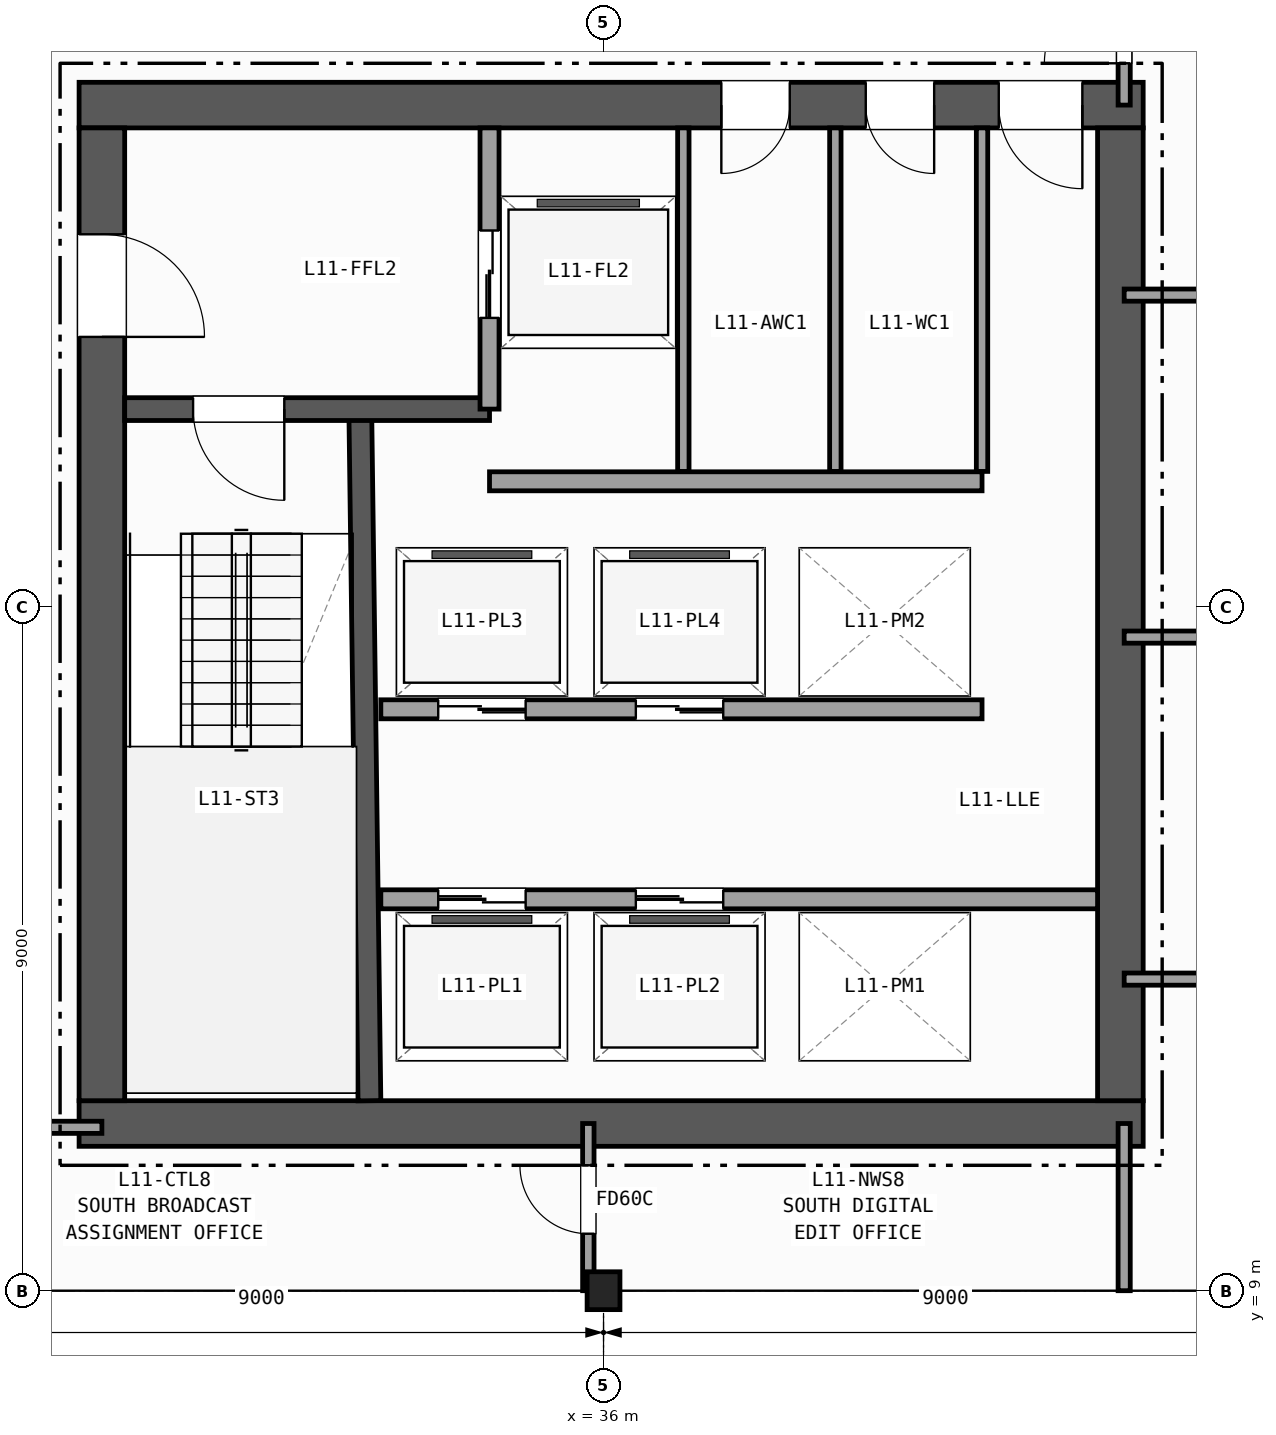
"""IFC4 building model, lengths in metres.
Left out: names, types, materials, properties, quantities, classifications, styles, units other than length and angle.
Written with IfcOpenShell. Run it as: python <this file> out.ifc"""

import sys

from ifc_helpers import new_model, si_unit, direction, frame, frame_2d, origin, origin_2d, place, context, subcontext, project, spatial, rectangle, i_section, extrude, element, fill, save


model = new_model("IFC4")
c1 = context("Model", 3, precision=1e-05, world=origin(), true_north=direction((0.0, 1.0)))
c2 = subcontext(c1, "Body", "Model", "MODEL_VIEW")
j1 = project(units=[si_unit("LENGTHUNIT", "METRE"), si_unit("PLANEANGLEUNIT", "RADIAN")], contexts=[c1])
p1 = place(None, origin())
s1 = spatial("IfcSite", under=j1, at=p1, CompositionType="ELEMENT")
p2 = place(p1, origin())
s2 = spatial("IfcBuilding", under=s1, at=p2, CompositionType="ELEMENT")
p3 = place(p2, frame((0.0, 0.0, 50.8)))
s3 = spatial("IfcBuildingStorey", under=s2, at=p3, CompositionType="ELEMENT", Elevation=50.8)
p4 = place(p3, frame((36.0, 9.0, 0.0), z_axis=(0.0, 0.0, 1.0), x_axis=(1.0, 0.0, 0.0)))
e1 = element("IfcColumn", 1, at=p4, inside=s3, PredefinedType="COLUMN", context=c2, shape_type="SweptSolid", body=[
    extrude(i_section(OverallWidth=0.432, OverallDepth=0.498, WebThickness=0.056, FlangeThickness=0.089, FilletRadius=0.015, at=origin_2d()), origin(), (0.0, 0.0, 1.0), 3.7),
])
p5 = place(p3, frame((29.1, 11.2, 0.0), z_axis=(0.0, 0.0, 1.0), x_axis=(1.0, 0.0, 0.0)))
e2 = element("IfcWall", 2, at=p5, inside=s3, PredefinedType="SHEAR", context=c2, shape_type="SweptSolid", body=[
    extrude(rectangle(XDim=14.0, YDim=0.6, at=frame_2d((7.0, 0.0))), origin(), (0.0, 0.0, 1.0), 3.42),
])
p6 = place(p3, frame((43.1, 24.6, 0.0), z_axis=(0.0, 0.0, 1.0), x_axis=(-1.0, 0.0, 0.0)))
e3 = element("IfcWall", 3, at=p6, inside=s3, PredefinedType="SHEAR", context=c2, shape_type="SweptSolid", body=[
    extrude(rectangle(XDim=14.0, YDim=0.6, at=frame_2d((7.0, 0.0))), origin(), (0.0, 0.0, 1.0), 3.42),
])
p7 = place(p6, frame((0.8, 0.0, 0.0)))
e4 = element("IfcOpeningElement", 4, at=p7, cuts=e3, PredefinedType="OPENING", context=c2, shape_type="SweptSolid", body=[
    extrude(rectangle(XDim=1.1, YDim=2.15, at=frame_2d((0.55, 1.075))), frame((0.0, 0.31, 0.0), z_axis=(0.0, -1.0, 0.0), x_axis=(1.0, 0.0, 0.0)), (0.0, 0.0, 1.0), 0.62),
])
p8 = place(p6, frame((2.75, 0.0, 0.0)))
e5 = element("IfcOpeningElement", 5, at=p8, cuts=e3, PredefinedType="OPENING", context=c2, shape_type="SweptSolid", body=[
    extrude(rectangle(XDim=0.9, YDim=2.1, at=frame_2d((0.45, 1.05))), frame((0.0, 0.31, 0.0), z_axis=(0.0, -1.0, 0.0), x_axis=(1.0, 0.0, 0.0)), (0.0, 0.0, 1.0), 0.62),
])
p9 = place(p6, frame((4.65, 0.0, 0.0)))
e6 = element("IfcOpeningElement", 6, at=p9, cuts=e3, PredefinedType="OPENING", context=c2, shape_type="SweptSolid", body=[
    extrude(rectangle(XDim=0.9, YDim=2.1, at=frame_2d((0.45, 1.05))), frame((0.0, 0.31, 0.0), z_axis=(0.0, -1.0, 0.0), x_axis=(1.0, 0.0, 0.0)), (0.0, 0.0, 1.0), 0.62),
])
p10 = place(p3, frame((29.4, 24.3, 0.0), z_axis=(0.0, 0.0, 1.0), x_axis=(0.0, -1.0, 0.0)))
e7 = element("IfcWall", 7, at=p10, inside=s3, PredefinedType="SHEAR", context=c2, shape_type="SweptSolid", body=[
    extrude(rectangle(XDim=12.8, YDim=0.6, at=frame_2d((6.4, 0.0))), origin(), (0.0, 0.0, 1.0), 3.42),
])
p11 = place(p10, frame((1.4, 0.0, 0.0)))
e8 = element("IfcOpeningElement", 8, at=p11, cuts=e7, PredefinedType="OPENING", context=c2, shape_type="SweptSolid", body=[
    extrude(rectangle(XDim=1.35, YDim=2.15, at=frame_2d((0.675, 1.075))), frame((0.0, 0.31, 0.0), z_axis=(0.0, -1.0, 0.0), x_axis=(1.0, 0.0, 0.0)), (0.0, 0.0, 1.0), 0.62),
])
p12 = place(p3, frame((42.8, 11.5, 0.0), z_axis=(0.0, 0.0, 1.0), x_axis=(0.0, 1.0, 0.0)))
e9 = element("IfcWall", 9, at=p12, inside=s3, PredefinedType="SHEAR", context=c2, shape_type="SweptSolid", body=[
    extrude(rectangle(XDim=12.8, YDim=0.6, at=frame_2d((6.4, 0.0))), origin(), (0.0, 0.0, 1.0), 3.42),
])
p13 = place(p3, frame((32.92, 11.5, 0.0), z_axis=(0.0, 0.0, 1.0), x_axis=(-0.013244407292, 0.999912288991, 0.0)))
e10 = element("IfcWall", 10, at=p13, inside=s3, PredefinedType="SHEAR", context=c2, shape_type="SweptSolid", body=[
    extrude(rectangle(XDim=9.051, YDim=0.3, at=frame_2d((4.525, 0.0))), origin(), (0.0, 0.0, 1.0), 3.42),
])
p14 = place(p3, frame((34.5, 20.6, 0.0), z_axis=(0.0, 0.0, 1.0), x_axis=(-1.0, 0.0, 0.0)))
e11 = element("IfcWall", 11, at=p14, inside=s3, PredefinedType="SHEAR", context=c2, shape_type="SweptSolid", body=[
    extrude(rectangle(XDim=4.8, YDim=0.3, at=frame_2d((2.4, 0.0))), origin(), (0.0, 0.0, 1.0), 3.42),
])
p15 = place(p14, frame((2.7, 0.0, 0.0)))
e12 = element("IfcOpeningElement", 12, at=p15, cuts=e11, PredefinedType="OPENING", context=c2, shape_type="SweptSolid", body=[
    extrude(rectangle(XDim=1.2, YDim=2.15, at=frame_2d((0.6, 1.075))), frame((0.0, 0.16, 0.0), z_axis=(0.0, -1.0, 0.0), x_axis=(1.0, 0.0, 0.0)), (0.0, 0.0, 1.0), 0.32),
])
p16 = place(p3, frame((34.5, 20.6, 0.0), z_axis=(0.0, 0.0, 1.0), x_axis=(0.0, 1.0, 0.0)))
e13 = element("IfcWall", 13, at=p16, inside=s3, PredefinedType="PARTITIONING", context=c2, shape_type="SweptSolid", body=[
    extrude(rectangle(XDim=3.7, YDim=0.25, at=frame_2d((1.85, 0.0))), origin(), (0.0, 0.0, 1.0), 3.42),
])
p17 = place(p16, frame((1.2, 0.0, 0.0)))
e14 = element("IfcOpeningElement", 14, at=p17, cuts=e13, PredefinedType="OPENING", context=c2, shape_type="SweptSolid", body=[
    extrude(rectangle(XDim=1.15, YDim=2.15, at=frame_2d((0.575, 1.075))), frame((0.0, 0.135, 0.0), z_axis=(0.0, -1.0, 0.0), x_axis=(1.0, 0.0, 0.0)), (0.0, 0.0, 1.0), 0.27),
])
p18 = place(p3, frame((34.5, 19.65, 0.0), z_axis=(0.0, 0.0, 1.0), x_axis=(1.0, 0.0, 0.0)))
e15 = element("IfcWall", 15, at=p18, inside=s3, PredefinedType="PARTITIONING", context=c2, shape_type="SweptSolid", body=[
    extrude(rectangle(XDim=6.48, YDim=0.25, at=frame_2d((3.24, 0.0))), origin(), (0.0, 0.0, 1.0), 3.42),
])
p19 = place(p3, frame((33.07, 14.15, 0.0), z_axis=(0.0, 0.0, 1.0), x_axis=(1.0, 0.0, 0.0)))
e16 = element("IfcWall", 16, at=p19, inside=s3, PredefinedType="PARTITIONING", context=c2, shape_type="SweptSolid", body=[
    extrude(rectangle(XDim=9.43, YDim=0.25, at=frame_2d((4.715, 0.0))), origin(), (0.0, 0.0, 1.0), 3.42),
])
p20 = place(p19, frame((0.755, 0.0, 0.0)))
e17 = element("IfcOpeningElement", 17, at=p20, cuts=e16, PredefinedType="OPENING", context=c2, shape_type="SweptSolid", body=[
    extrude(rectangle(XDim=1.15, YDim=2.15, at=frame_2d((0.575, 1.075))), frame((0.0, 0.135, 0.0), z_axis=(0.0, -1.0, 0.0), x_axis=(1.0, 0.0, 0.0)), (0.0, 0.0, 1.0), 0.27),
])
p21 = place(p19, frame((3.355, 0.0, 0.0)))
e18 = element("IfcOpeningElement", 18, at=p21, cuts=e16, PredefinedType="OPENING", context=c2, shape_type="SweptSolid", body=[
    extrude(rectangle(XDim=1.15, YDim=2.15, at=frame_2d((0.575, 1.075))), frame((0.0, 0.135, 0.0), z_axis=(0.0, -1.0, 0.0), x_axis=(1.0, 0.0, 0.0)), (0.0, 0.0, 1.0), 0.27),
])
p22 = place(p3, frame((40.98, 16.65, 0.0), z_axis=(0.0, 0.0, 1.0), x_axis=(-1.0, 0.0, 0.0)))
e19 = element("IfcWall", 19, at=p22, inside=s3, PredefinedType="PARTITIONING", context=c2, shape_type="SweptSolid", body=[
    extrude(rectangle(XDim=7.91, YDim=0.25, at=frame_2d((3.955, 0.0))), origin(), (0.0, 0.0, 1.0), 3.42),
])
p23 = place(p22, frame((6.005, 0.0, 0.0)))
e20 = element("IfcOpeningElement", 20, at=p23, cuts=e19, PredefinedType="OPENING", context=c2, shape_type="SweptSolid", body=[
    extrude(rectangle(XDim=1.15, YDim=2.15, at=frame_2d((0.575, 1.075))), frame((0.0, 0.135, 0.0), z_axis=(0.0, -1.0, 0.0), x_axis=(1.0, 0.0, 0.0)), (0.0, 0.0, 1.0), 0.27),
])
p24 = place(p22, frame((3.405, 0.0, 0.0)))
e21 = element("IfcOpeningElement", 21, at=p24, cuts=e19, PredefinedType="OPENING", context=c2, shape_type="SweptSolid", body=[
    extrude(rectangle(XDim=1.15, YDim=2.15, at=frame_2d((0.575, 1.075))), frame((0.0, 0.135, 0.0), z_axis=(0.0, -1.0, 0.0), x_axis=(1.0, 0.0, 0.0)), (0.0, 0.0, 1.0), 0.27),
])
for number, where, z_axis, x_axis in (
    (22, (37.05, 19.78, 0.0), (0.0, 0.0, 1.0), (0.0, 1.0, 0.0)),
    (23, (39.05, 19.78, 0.0), (0.0, 0.0, 1.0), (0.0, 1.0, 0.0)),
    (24, (40.98, 19.78, 0.0), (0.0, 0.0, 1.0), (0.0, 1.0, 0.0)),
):
    element("IfcWall", number, at=place(p3, frame(where, z_axis=z_axis, x_axis=x_axis)), inside=s3, PredefinedType="PARTITIONING", context=c2, shape_type="SweptSolid", body=[
        extrude(rectangle(XDim=4.52, YDim=0.15, at=frame_2d((2.26, 0.0))), origin(), (0.0, 0.0, 1.0), 3.42),
    ])
p25 = place(p3, frame((24.65, 11.15, 0.0), z_axis=(0.0, 0.0, 1.0), x_axis=(1.0, 0.0, 0.0)))
e25 = element("IfcWall", 25, at=p25, inside=s3, PredefinedType="PARTITIONING", context=c2, shape_type="SweptSolid", body=[
    extrude(rectangle(XDim=4.75, YDim=0.16, at=frame_2d((2.375, 0.0))), origin(), (0.0, 0.0, 1.0), 2.792),
])
p26 = place(p25, frame((1.2, 0.0, 0.0)))
e26 = element("IfcOpeningElement", 26, at=p26, cuts=e25, PredefinedType="OPENING", context=c2, shape_type="SweptSolid", body=[
    extrude(rectangle(XDim=0.95, YDim=2.1, at=frame_2d((0.475, 1.05))), frame((0.0, 0.09, 0.0), z_axis=(0.0, -1.0, 0.0), x_axis=(1.0, 0.0, 0.0)), (0.0, 0.0, 1.0), 0.18),
])
p27 = place(p3, frame((35.8, 9.0, 0.0), z_axis=(0.0, 0.0, 1.0), x_axis=(0.0, 1.0, 0.0)))
e27 = element("IfcWall", 27, at=p27, inside=s3, PredefinedType="PARTITIONING", context=c2, shape_type="SweptSolid", body=[
    extrude(rectangle(XDim=2.2, YDim=0.15, at=frame_2d((1.1, 0.0))), origin(), (0.0, 0.0, 1.0), 2.627),
])
p28 = place(p27, frame((0.75, 0.0, 0.0)))
e28 = element("IfcOpeningElement", 28, at=p28, cuts=e27, PredefinedType="OPENING", context=c2, shape_type="SweptSolid", body=[
    extrude(rectangle(XDim=0.9, YDim=2.1, at=frame_2d((0.45, 1.05))), frame((0.0, 0.085, 0.0), z_axis=(0.0, -1.0, 0.0), x_axis=(1.0, 0.0, 0.0)), (0.0, 0.0, 1.0), 0.17),
])
p29 = place(p3, frame((42.85, 9.0, 0.0), z_axis=(0.0, 0.0, 1.0), x_axis=(0.0, 1.0, 0.0)))
e29 = element("IfcWall", 29, at=p29, inside=s3, PredefinedType="PARTITIONING", context=c2, shape_type="SweptSolid", body=[
    extrude(rectangle(XDim=2.2, YDim=0.16, at=frame_2d((1.1, 0.0))), origin(), (0.0, 0.0, 1.0), 2.627),
])
p30 = place(p3, frame((42.85, 24.6, 0.0), z_axis=(0.0, 0.0, 1.0), x_axis=(0.0, 1.0, 0.0)))
e30 = element("IfcWall", 30, at=p30, inside=s3, PredefinedType="PARTITIONING", context=c2, shape_type="SweptSolid", body=[
    extrude(rectangle(XDim=2.4, YDim=0.16, at=frame_2d((1.2, 0.0))), origin(), (0.0, 0.0, 1.0), 2.627),
])
p31 = place(p30, frame((0.55, 0.0, 0.0)))
e31 = element("IfcOpeningElement", 31, at=p31, cuts=e30, PredefinedType="OPENING", context=c2, shape_type="SweptSolid", body=[
    extrude(rectangle(XDim=1.05, YDim=2.15, at=frame_2d((0.525, 1.075))), frame((0.0, 0.09, 0.0), z_axis=(0.0, -1.0, 0.0), x_axis=(1.0, 0.0, 0.0)), (0.0, 0.0, 1.0), 0.18),
])
p32 = place(p3, frame((42.85, 13.1, 0.0), z_axis=(0.0, 0.0, 1.0), x_axis=(1.0, 0.0, 0.0)))
e32 = element("IfcWall", 32, at=p32, inside=s3, PredefinedType="PARTITIONING", context=c2, shape_type="SweptSolid", body=[
    extrude(rectangle(XDim=20.346, YDim=0.16, at=frame_2d((10.173, 0.0))), origin(), (0.0, 0.0, 1.0), 3.42),
])
p33 = place(p32, frame((4.6, 0.0, 0.0)))
e33 = element("IfcOpeningElement", 33, at=p33, cuts=e32, PredefinedType="OPENING", context=c2, shape_type="SweptSolid", body=[
    extrude(rectangle(XDim=1.2, YDim=2.15, at=frame_2d((0.6, 1.075))), frame((0.0, 0.09, 0.0), z_axis=(0.0, -1.0, 0.0), x_axis=(1.0, 0.0, 0.0)), (0.0, 0.0, 1.0), 0.18),
])
p34 = place(p3, frame((42.85, 17.6, 0.0), z_axis=(0.0, 0.0, 1.0), x_axis=(1.0, 0.0, 0.0)))
e34 = element("IfcWall", 34, at=p34, inside=s3, PredefinedType="PARTITIONING", context=c2, shape_type="SweptSolid", body=[
    extrude(rectangle(XDim=20.809, YDim=0.16, at=frame_2d((10.404, 0.0))), origin(), (0.0, 0.0, 1.0), 3.42),
])
p35 = place(p34, frame((4.6, 0.0, 0.0)))
e35 = element("IfcOpeningElement", 35, at=p35, cuts=e34, PredefinedType="OPENING", context=c2, shape_type="SweptSolid", body=[
    extrude(rectangle(XDim=0.86, YDim=2.05, at=frame_2d((0.43, 1.025))), frame((0.0, 0.09, 0.0), z_axis=(0.0, -1.0, 0.0), x_axis=(1.0, 0.0, 0.0)), (0.0, 0.0, 1.0), 0.18),
])
p36 = place(p3, frame((42.85, 22.1, 0.0), z_axis=(0.0, 0.0, 1.0), x_axis=(1.0, 0.0, 0.0)))
e36 = element("IfcWall", 36, at=p36, inside=s3, PredefinedType="PARTITIONING", context=c2, shape_type="SweptSolid", body=[
    extrude(rectangle(XDim=20.428, YDim=0.16, at=frame_2d((10.214, 0.0))), origin(), (0.0, 0.0, 1.0), 3.42),
])
p37 = place(p36, frame((4.6, 0.0, 0.0)))
e37 = element("IfcOpeningElement", 37, at=p37, cuts=e36, PredefinedType="OPENING", context=c2, shape_type="SweptSolid", body=[
    extrude(rectangle(XDim=0.95, YDim=2.1, at=frame_2d((0.475, 1.05))), frame((0.0, 0.09, 0.0), z_axis=(0.0, -1.0, 0.0), x_axis=(1.0, 0.0, 0.0)), (0.0, 0.0, 1.0), 0.18),
])
p38 = place(p15, origin())
e38 = element("IfcDoor", 38, at=p38, inside=s3, OperationType="SINGLE_SWING_LEFT", PredefinedType="DOOR", context=c2, shape_type="SweptSolid", body=[
    extrude(rectangle(XDim=1.2, YDim=2.15, at=frame_2d((0.6, 1.075))), frame((0.0, 0.025, 0.0), z_axis=(0.0, -1.0, 0.0), x_axis=(1.0, 0.0, 0.0)), (0.0, 0.0, 1.0), 0.05),
])
fill(e12, e38)
p39 = place(p11, origin())
e39 = element("IfcDoor", 39, at=p39, inside=s3, OperationType="SINGLE_SWING_RIGHT", PredefinedType="DOOR", context=c2, shape_type="SweptSolid", body=[
    extrude(rectangle(XDim=1.35, YDim=2.15, at=frame_2d((0.675, 1.075))), frame((0.0, 0.025, 0.0), z_axis=(0.0, -1.0, 0.0), x_axis=(1.0, 0.0, 0.0)), (0.0, 0.0, 1.0), 0.05),
])
fill(e8, e39)
p40 = place(p7, origin())
e40 = element("IfcDoor", 40, at=p40, inside=s3, OperationType="SINGLE_SWING_LEFT", PredefinedType="DOOR", context=c2, shape_type="SweptSolid", body=[
    extrude(rectangle(XDim=1.1, YDim=2.15, at=frame_2d((0.55, 1.075))), frame((0.0, 0.025, 0.0), z_axis=(0.0, -1.0, 0.0), x_axis=(1.0, 0.0, 0.0)), (0.0, 0.0, 1.0), 0.05),
])
fill(e4, e40)
p41 = place(p8, origin())
e41 = element("IfcDoor", 41, at=p41, inside=s3, OperationType="SINGLE_SWING_LEFT", PredefinedType="DOOR", context=c2, shape_type="SweptSolid", body=[
    extrude(rectangle(XDim=0.9, YDim=2.1, at=frame_2d((0.45, 1.05))), frame((0.0, 0.025, 0.0), z_axis=(0.0, -1.0, 0.0), x_axis=(1.0, 0.0, 0.0)), (0.0, 0.0, 1.0), 0.05),
])
fill(e5, e41)
p42 = place(p9, origin())
e42 = element("IfcDoor", 42, at=p42, inside=s3, OperationType="SINGLE_SWING_RIGHT", PredefinedType="DOOR", context=c2, shape_type="SweptSolid", body=[
    extrude(rectangle(XDim=0.9, YDim=2.1, at=frame_2d((0.45, 1.05))), frame((0.0, 0.025, 0.0), z_axis=(0.0, -1.0, 0.0), x_axis=(1.0, 0.0, 0.0)), (0.0, 0.0, 1.0), 0.05),
])
fill(e6, e42)
p43 = place(p17, origin())
e43 = element("IfcDoor", 43, at=p43, inside=s3, OperationType="DOUBLE_DOOR_SLIDING", PredefinedType="DOOR", context=c2, shape_type="SweptSolid", body=[
    extrude(rectangle(XDim=1.15, YDim=2.15, at=frame_2d((0.575, 1.075))), frame((0.0, 0.025, 0.0), z_axis=(0.0, -1.0, 0.0), x_axis=(1.0, 0.0, 0.0)), (0.0, 0.0, 1.0), 0.05),
])
fill(e14, e43)
p44 = place(p20, origin())
e44 = element("IfcDoor", 44, at=p44, inside=s3, OperationType="DOUBLE_DOOR_SLIDING", PredefinedType="DOOR", context=c2, shape_type="SweptSolid", body=[
    extrude(rectangle(XDim=1.15, YDim=2.15, at=frame_2d((0.575, 1.075))), frame((0.0, 0.025, 0.0), z_axis=(0.0, -1.0, 0.0), x_axis=(1.0, 0.0, 0.0)), (0.0, 0.0, 1.0), 0.05),
])
fill(e17, e44)
p45 = place(p21, origin())
e45 = element("IfcDoor", 45, at=p45, inside=s3, OperationType="DOUBLE_DOOR_SLIDING", PredefinedType="DOOR", context=c2, shape_type="SweptSolid", body=[
    extrude(rectangle(XDim=1.15, YDim=2.15, at=frame_2d((0.575, 1.075))), frame((0.0, 0.025, 0.0), z_axis=(0.0, -1.0, 0.0), x_axis=(1.0, 0.0, 0.0)), (0.0, 0.0, 1.0), 0.05),
])
fill(e18, e45)
p46 = place(p23, origin())
e46 = element("IfcDoor", 46, at=p46, inside=s3, OperationType="DOUBLE_DOOR_SLIDING", PredefinedType="DOOR", context=c2, shape_type="SweptSolid", body=[
    extrude(rectangle(XDim=1.15, YDim=2.15, at=frame_2d((0.575, 1.075))), frame((0.0, 0.025, 0.0), z_axis=(0.0, -1.0, 0.0), x_axis=(1.0, 0.0, 0.0)), (0.0, 0.0, 1.0), 0.05),
])
fill(e20, e46)
p47 = place(p24, origin())
e47 = element("IfcDoor", 47, at=p47, inside=s3, OperationType="DOUBLE_DOOR_SLIDING", PredefinedType="DOOR", context=c2, shape_type="SweptSolid", body=[
    extrude(rectangle(XDim=1.15, YDim=2.15, at=frame_2d((0.575, 1.075))), frame((0.0, 0.025, 0.0), z_axis=(0.0, -1.0, 0.0), x_axis=(1.0, 0.0, 0.0)), (0.0, 0.0, 1.0), 0.05),
])
fill(e21, e47)
p48 = place(p28, origin())
e48 = element("IfcDoor", 48, at=p48, inside=s3, OperationType="SINGLE_SWING_RIGHT", PredefinedType="DOOR", context=c2, shape_type="SweptSolid", body=[
    extrude(rectangle(XDim=0.9, YDim=2.1, at=frame_2d((0.45, 1.05))), frame((0.0, 0.025, 0.0), z_axis=(0.0, -1.0, 0.0), x_axis=(1.0, 0.0, 0.0)), (0.0, 0.0, 1.0), 0.05),
])
fill(e28, e48)
p49 = place(p31, origin())
e49 = element("IfcDoor", 49, at=p49, inside=s3, OperationType="SINGLE_SWING_LEFT", PredefinedType="DOOR", context=c2, shape_type="SweptSolid", body=[
    extrude(rectangle(XDim=1.05, YDim=2.15, at=frame_2d((0.525, 1.075))), frame((0.0, 0.025, 0.0), z_axis=(0.0, -1.0, 0.0), x_axis=(1.0, 0.0, 0.0)), (0.0, 0.0, 1.0), 0.05),
])
fill(e31, e49)
save(model, sys.argv[1])
